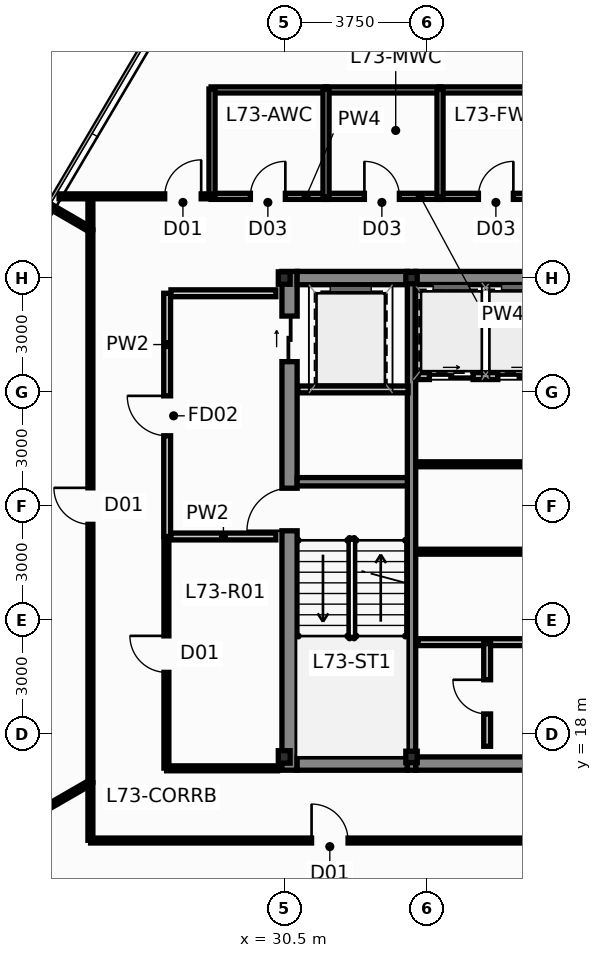
"""IFC4 building model, lengths in metres.
Left out: names, types, materials, properties, quantities, classifications, styles, units other than length and angle.
Written with IfcOpenShell. Run it as: python <this file> out.ifc"""

import sys

from ifc_helpers import new_model, si_unit, direction, frame, frame_2d, origin, origin_2d, place, context, subcontext, project, spatial, rectangle, hollow_rectangle, i_section, extrude, source, transform, mapped, element, fill, save


model = new_model("IFC4")
c1 = context("Model", 3, precision=1e-05, world=origin(), true_north=direction((0.0, 1.0)))
c2 = subcontext(c1, "Body", "Model", "MODEL_VIEW")
j1 = project(units=[si_unit("LENGTHUNIT", "METRE"), si_unit("PLANEANGLEUNIT", "RADIAN")], contexts=[c1])
p1 = place(None, origin())
s1 = spatial("IfcSite", under=j1, at=p1, CompositionType="ELEMENT")
p2 = place(p1, origin())
s2 = spatial("IfcBuilding", under=s1, at=p2, CompositionType="ELEMENT")
p3 = place(p2, frame((0.0, 0.0, 277.3)))
s3 = spatial("IfcBuildingStorey", under=s2, at=p3, CompositionType="ELEMENT", Elevation=277.3)
m1 = source(origin(), c2, "Body", "SweptSolid", [
    extrude(i_section(OverallWidth=0.311, OverallDepth=0.327, WebThickness=0.016, FlangeThickness=0.025, at=origin_2d()), origin(), (0.0, 0.0, 1.0), 3.65),
])
for number, where, z_axis, x_axis in (
    (1, (30.5, 17.4, 0.0), (0.0, 0.0, 1.0), (1.0, 0.0, 0.0)),
    (2, (30.5, 30.0, 0.0), (0.0, 0.0, 1.0), (1.0, 0.0, 0.0)),
):
    element("IfcColumn", number, at=place(p3, frame(where, z_axis=z_axis, x_axis=x_axis)), inside=s3, PredefinedType="COLUMN", context=c2, shape_type="MappedRepresentation", body=[
        mapped(m1, transform((0.0, 0.0, 0.0), scale=1.0)),
    ])
m2 = source(origin(), c2, "Body", "SweptSolid", [
    extrude(hollow_rectangle(XDim=0.3, YDim=0.3, WallThickness=0.012, at=origin_2d()), origin(), (0.0, 0.0, 1.0), 3.65),
])
for number, where, z_axis, x_axis in (
    (3, (33.85, 17.4, 0.0), (0.0, 0.0, 1.0), (1.0, 0.0, 0.0)),
    (4, (33.85, 30.0, 0.0), (0.0, 0.0, 1.0), (1.0, 0.0, 0.0)),
):
    element("IfcColumn", number, at=place(p3, frame(where, z_axis=z_axis, x_axis=x_axis)), inside=s3, PredefinedType="COLUMN", context=c2, shape_type="MappedRepresentation", body=[
        mapped(m2, transform((0.0, 0.0, 0.0), scale=1.0)),
    ])
p4 = place(p3, frame((30.64, 17.05, 0.0), z_axis=(0.0, 0.0, 1.0), x_axis=(0.0, 1.0, 0.0)))
e5 = element("IfcWall", 5, at=p4, inside=s3, PredefinedType="SHEAR", context=c2, shape_type="SweptSolid", body=[
    extrude(rectangle(XDim=13.125, YDim=0.4, at=frame_2d((6.562, 0.0))), origin(), (0.0, 0.0, 1.0), 3.65),
])
p5 = place(p4, frame((6.3, 0.0, 0.0)))
e6 = element("IfcOpeningElement", 6, at=p5, cuts=e5, PredefinedType="OPENING", context=c2, shape_type="SweptSolid", body=[
    extrude(rectangle(XDim=1.12, YDim=2.15, at=frame_2d((0.56, 1.075))), frame((0.0, 0.212, 0.0), z_axis=(0.0, -1.0, 0.0), x_axis=(1.0, 0.0, 0.0)), (0.0, 0.0, 1.0), 0.424),
])
p6 = place(p4, frame((10.75, 0.0, 0.0)))
e7 = element("IfcOpeningElement", 7, at=p6, cuts=e5, PredefinedType="OPENING", context=c2, shape_type="SweptSolid", body=[
    extrude(rectangle(XDim=1.2, YDim=2.2, at=frame_2d((0.6, 1.1))), frame((0.0, 0.212, 0.0), z_axis=(0.0, -1.0, 0.0), x_axis=(1.0, 0.0, 0.0)), (0.0, 0.0, 1.0), 0.424),
])
p7 = place(p3, frame((30.84, 17.225, 0.0), z_axis=(0.0, 0.0, 1.0), x_axis=(1.0, 0.0, 0.0)))
e8 = element("IfcWall", 8, at=p7, inside=s3, PredefinedType="SHEAR", context=c2, shape_type="SweptSolid", body=[
    extrude(rectangle(XDim=2.9, YDim=0.35, at=frame_2d((1.45, 0.0))), origin(), (0.0, 0.0, 1.0), 3.65),
])
p8 = place(p3, frame((33.96, 17.225, 0.0), z_axis=(0.0, 0.0, 1.0), x_axis=(1.0, 0.0, 0.0)))
e9 = element("IfcWall", 9, at=p8, inside=s3, PredefinedType="SHEAR", context=c2, shape_type="SweptSolid", body=[
    extrude(rectangle(XDim=8.08, YDim=0.35, at=frame_2d((4.04, 0.0))), origin(), (0.0, 0.0, 1.0), 3.65),
])
p9 = place(p3, frame((30.84, 30.0, 0.0), z_axis=(0.0, 0.0, 1.0), x_axis=(1.0, 0.0, 0.0)))
e10 = element("IfcWall", 10, at=p9, inside=s3, PredefinedType="SHEAR", context=c2, shape_type="SweptSolid", body=[
    extrude(rectangle(XDim=2.9, YDim=0.35, at=frame_2d((1.45, 0.0))), origin(), (0.0, 0.0, 1.0), 3.65),
])
p10 = place(p3, frame((33.96, 30.0, 0.0), z_axis=(0.0, 0.0, 1.0), x_axis=(1.0, 0.0, 0.0)))
e11 = element("IfcWall", 11, at=p10, inside=s3, PredefinedType="SHEAR", context=c2, shape_type="SweptSolid", body=[
    extrude(rectangle(XDim=3.78, YDim=0.35, at=frame_2d((1.89, 0.0))), origin(), (0.0, 0.0, 1.0), 3.65),
])
p11 = place(p3, frame((33.85, 17.05, 0.0), z_axis=(0.0, 0.0, 1.0), x_axis=(0.0, 1.0, 0.0)))
e12 = element("IfcWall", 12, at=p11, inside=s3, PredefinedType="SHEAR", context=c2, shape_type="SweptSolid", body=[
    extrude(rectangle(XDim=13.125, YDim=0.22, at=frame_2d((6.562, 0.0))), origin(), (0.0, 0.0, 1.0), 3.65),
])
p12 = place(p3, frame((30.84, 24.64, 0.0), z_axis=(0.0, 0.0, 1.0), x_axis=(1.0, 0.0, 0.0)))
e13 = element("IfcWall", 13, at=p12, inside=s3, PredefinedType="SHEAR", context=c2, shape_type="SweptSolid", body=[
    extrude(rectangle(XDim=2.9, YDim=0.22, at=frame_2d((1.45, 0.0))), origin(), (0.0, 0.0, 1.0), 3.65),
])
p13 = place(p3, frame((34.02, 27.42, 0.0), z_axis=(0.0, 0.0, 1.0), x_axis=(1.0, 0.0, 0.0)))
e14 = element("IfcWall", 14, at=p13, inside=s3, PredefinedType="PARTITIONING", context=c2, shape_type="SweptSolid", body=[
    extrude(rectangle(XDim=3.66, YDim=0.18, at=frame_2d((1.83, 0.0))), origin(), (0.0, 0.0, 1.0), 3.4),
])
p14 = place(p13, frame((0.3, 0.0, 0.0)))
e15 = element("IfcOpeningElement", 15, at=p14, cuts=e14, PredefinedType="OPENING", context=c2, shape_type="SweptSolid", body=[
    extrude(rectangle(XDim=1.15, YDim=2.2, at=frame_2d((0.575, 1.1))), frame((0.0, 0.102, 0.0), z_axis=(0.0, -1.0, 0.0), x_axis=(1.0, 0.0, 0.0)), (0.0, 0.0, 1.0), 0.204),
])
p15 = place(p13, frame((2.1, 0.0, 0.0)))
e16 = element("IfcOpeningElement", 16, at=p15, cuts=e14, PredefinedType="OPENING", context=c2, shape_type="SweptSolid", body=[
    extrude(rectangle(XDim=1.15, YDim=2.2, at=frame_2d((0.575, 1.1))), frame((0.0, 0.102, 0.0), z_axis=(0.0, -1.0, 0.0), x_axis=(1.0, 0.0, 0.0)), (0.0, 0.0, 1.0), 0.204),
])
p16 = place(p3, frame((27.42, 23.2, 0.0), z_axis=(0.0, 0.0, 1.0), x_axis=(0.0, 1.0, 0.0)))
e17 = element("IfcWall", 17, at=p16, inside=s3, PredefinedType="PARTITIONING", context=c2, shape_type="SweptSolid", body=[
    extrude(rectangle(XDim=6.4, YDim=0.18, at=frame_2d((3.2, 0.0))), origin(), (0.0, 0.0, 1.0), 3.085),
])
p17 = place(p16, frame((2.65, 0.0, 0.0)))
e18 = element("IfcOpeningElement", 18, at=p17, cuts=e17, PredefinedType="OPENING", context=c2, shape_type="SweptSolid", body=[
    extrude(rectangle(XDim=1.05, YDim=2.15, at=frame_2d((0.525, 1.075))), frame((0.0, 0.102, 0.0), z_axis=(0.0, -1.0, 0.0), x_axis=(1.0, 0.0, 0.0)), (0.0, 0.0, 1.0), 0.204),
])
for number, where, z_axis, x_axis in (
    (19, (27.52, 23.2, 0.0), (0.0, 0.0, 1.0), (1.0, 0.0, 0.0)),
    (20, (27.52, 29.6, 0.0), (0.0, 0.0, 1.0), (1.0, 0.0, 0.0)),
):
    element("IfcWall", number, at=place(p3, frame(where, z_axis=z_axis, x_axis=x_axis)), inside=s3, PredefinedType="PARTITIONING", context=c2, shape_type="SweptSolid", body=[
        extrude(rectangle(XDim=2.76, YDim=0.18, at=frame_2d((1.38, 0.0))), origin(), (0.0, 0.0, 1.0), 3.4),
    ])
p18 = place(p3, frame((30.86, 27.07, 0.0), z_axis=(0.0, 0.0, 1.0), x_axis=(1.0, 0.0, 0.0)))
e21 = element("IfcWall", 21, at=p18, inside=s3, PredefinedType="PARTITIONING", context=c2, shape_type="SweptSolid", body=[
    extrude(rectangle(XDim=2.9, YDim=0.18, at=frame_2d((1.45, 0.0))), origin(), (0.0, 0.0, 1.0), 3.4),
])
p19 = place(p3, frame((34.02, 20.42, 0.0), z_axis=(0.0, 0.0, 1.0), x_axis=(1.0, 0.0, 0.0)))
e22 = element("IfcWall", 22, at=p19, inside=s3, PredefinedType="PARTITIONING", context=c2, shape_type="SweptSolid", body=[
    extrude(rectangle(XDim=3.64, YDim=0.18, at=frame_2d((1.82, 0.0))), origin(), (0.0, 0.0, 1.0), 3.4),
])
for number, where, z_axis, x_axis in (
    (23, (34.02, 22.8, 0.0), (0.0, 0.0, 1.0), (1.0, 0.0, 0.0)),
    (24, (34.02, 25.1, 0.0), (0.0, 0.0, 1.0), (1.0, 0.0, 0.0)),
):
    element("IfcWall", number, at=place(p3, frame(where, z_axis=z_axis, x_axis=x_axis)), inside=s3, PredefinedType="PARTITIONING", context=c2, shape_type="SweptSolid", body=[
        extrude(rectangle(XDim=3.58, YDim=0.13, at=frame_2d((1.79, 0.0))), origin(), (0.0, 0.0, 1.0), 3.4),
    ])
p20 = place(p3, frame((35.84, 17.68, 0.0), z_axis=(0.0, 0.0, 1.0), x_axis=(0.0, 1.0, 0.0)))
e25 = element("IfcWall", 25, at=p20, inside=s3, PredefinedType="PARTITIONING", context=c2, shape_type="SweptSolid", body=[
    extrude(rectangle(XDim=2.7, YDim=0.18, at=frame_2d((1.35, 0.0))), origin(), (0.0, 0.0, 1.0), 3.4),
])
p21 = place(p20, frame((0.85, 0.0, 0.0)))
e26 = element("IfcOpeningElement", 26, at=p21, cuts=e25, PredefinedType="OPENING", context=c2, shape_type="SweptSolid", body=[
    extrude(rectangle(XDim=0.9, YDim=2.1, at=frame_2d((0.45, 1.05))), frame((0.0, 0.102, 0.0), z_axis=(0.0, -1.0, 0.0), x_axis=(1.0, 0.0, 0.0)), (0.0, 0.0, 1.0), 0.204),
])
p22 = place(p3, frame((28.575, 32.15, 0.0), z_axis=(0.0, 0.0, 1.0), x_axis=(1.0, 0.0, 0.0)))
e27 = element("IfcWall", 27, at=p22, inside=s3, PredefinedType="PLUMBINGWALL", context=c2, shape_type="SweptSolid", body=[
    extrude(rectangle(XDim=3.05, YDim=0.16, at=frame_2d((1.525, 0.0))), origin(), (0.0, 0.0, 1.0), 3.085),
])
p23 = place(p22, frame((1.035, 0.0, 0.0)))
e28 = element("IfcOpeningElement", 28, at=p23, cuts=e27, PredefinedType="OPENING", context=c2, shape_type="SweptSolid", body=[
    extrude(rectangle(XDim=0.92, YDim=2.1, at=frame_2d((0.46, 1.05))), frame((0.0, 0.092, 0.0), z_axis=(0.0, -1.0, 0.0), x_axis=(1.0, 0.0, 0.0)), (0.0, 0.0, 1.0), 0.184),
])
p24 = place(p3, frame((31.575, 32.15, 0.0), z_axis=(0.0, 0.0, 1.0), x_axis=(1.0, 0.0, 0.0)))
e29 = element("IfcWall", 29, at=p24, inside=s3, PredefinedType="PLUMBINGWALL", context=c2, shape_type="SweptSolid", body=[
    extrude(rectangle(XDim=3.05, YDim=0.16, at=frame_2d((1.525, 0.0))), origin(), (0.0, 0.0, 1.0), 3.085),
])
p25 = place(p24, frame((1.035, 0.0, 0.0)))
e30 = element("IfcOpeningElement", 30, at=p25, cuts=e29, PredefinedType="OPENING", context=c2, shape_type="SweptSolid", body=[
    extrude(rectangle(XDim=0.92, YDim=2.1, at=frame_2d((0.46, 1.05))), frame((0.0, 0.092, 0.0), z_axis=(0.0, -1.0, 0.0), x_axis=(1.0, 0.0, 0.0)), (0.0, 0.0, 1.0), 0.184),
])
p26 = place(p3, frame((34.575, 32.15, 0.0), z_axis=(0.0, 0.0, 1.0), x_axis=(1.0, 0.0, 0.0)))
e31 = element("IfcWall", 31, at=p26, inside=s3, PredefinedType="PLUMBINGWALL", context=c2, shape_type="SweptSolid", body=[
    extrude(rectangle(XDim=3.05, YDim=0.16, at=frame_2d((1.525, 0.0))), origin(), (0.0, 0.0, 1.0), 3.085),
])
p27 = place(p26, frame((1.035, 0.0, 0.0)))
e32 = element("IfcOpeningElement", 32, at=p27, cuts=e31, PredefinedType="OPENING", context=c2, shape_type="SweptSolid", body=[
    extrude(rectangle(XDim=0.92, YDim=2.1, at=frame_2d((0.46, 1.05))), frame((0.0, 0.092, 0.0), z_axis=(0.0, -1.0, 0.0), x_axis=(1.0, 0.0, 0.0)), (0.0, 0.0, 1.0), 0.184),
])
p28 = place(p3, frame((28.575, 34.95, 0.0), z_axis=(0.0, 0.0, 1.0), x_axis=(1.0, 0.0, 0.0)))
e33 = element("IfcWall", 33, at=p28, inside=s3, PredefinedType="PLUMBINGWALL", context=c2, shape_type="SweptSolid", body=[
    extrude(rectangle(XDim=3.05, YDim=0.16, at=frame_2d((1.525, 0.0))), origin(), (0.0, 0.0, 1.0), 3.4),
])
for number, where, z_axis, x_axis in (
    (34, (31.575, 34.95, 0.0), (0.0, 0.0, 1.0), (1.0, 0.0, 0.0)),
    (35, (37.625, 34.95, 0.0), (0.0, 0.0, 1.0), (-1.0, 0.0, 0.0)),
):
    element("IfcWall", number, at=place(p3, frame(where, z_axis=z_axis, x_axis=x_axis)), inside=s3, PredefinedType="PLUMBINGWALL", context=c2, shape_type="SweptSolid", body=[
        extrude(rectangle(XDim=3.05, YDim=0.16, at=frame_2d((1.525, 0.0))), origin(), (0.0, 0.0, 1.0), 3.085),
    ])
for number, where, z_axis, x_axis in (
    (36, (31.6, 32.125, 0.0), (0.0, 0.0, 1.0), (0.0, 1.0, 0.0)),
    (37, (28.6, 32.125, 0.0), (0.0, 0.0, 1.0), (0.0, 1.0, 0.0)),
):
    element("IfcWall", number, at=place(p3, frame(where, z_axis=z_axis, x_axis=x_axis)), inside=s3, PredefinedType="PLUMBINGWALL", context=c2, shape_type="SweptSolid", body=[
        extrude(rectangle(XDim=2.85, YDim=0.16, at=frame_2d((1.425, 0.0))), origin(), (0.0, 0.0, 1.0), 2.985),
    ])
p29 = place(p3, frame((34.6, 32.125, 0.0), z_axis=(0.0, 0.0, 1.0), x_axis=(0.0, 1.0, 0.0)))
e38 = element("IfcWall", 38, at=p29, inside=s3, PredefinedType="PLUMBINGWALL", context=c2, shape_type="SweptSolid", body=[
    extrude(rectangle(XDim=2.85, YDim=0.16, at=frame_2d((1.425, 0.0))), origin(), (0.0, 0.0, 1.0), 3.4),
])
p30 = place(p3, frame((25.4, 16.735, 0.0), z_axis=(0.0, 0.0, 1.0), x_axis=(0.0, 1.0, 0.0)))
e39 = element("IfcWall", 39, at=p30, inside=s3, PredefinedType="PARTITIONING", context=c2, shape_type="SweptSolid", body=[
    extrude(rectangle(XDim=14.53, YDim=0.13, at=frame_2d((7.265, 0.0))), origin(), (0.0, 0.0, 1.0), 3.085),
])
p31 = place(p30, frame((6.785, 0.0, 0.0)))
e40 = element("IfcOpeningElement", 40, at=p31, cuts=e39, PredefinedType="OPENING", context=c2, shape_type="SweptSolid", body=[
    extrude(rectangle(XDim=0.96, YDim=2.15, at=frame_2d((0.48, 1.075))), frame((0.0, 0.077, 0.0), z_axis=(0.0, -1.0, 0.0), x_axis=(1.0, 0.0, 0.0)), (0.0, 0.0, 1.0), 0.154),
])
p32 = place(p3, frame((13.854, 10.059, 0.0), z_axis=(0.0, 0.0, 1.0), x_axis=(0.865873183118, 0.500263561293, 0.0)))
e41 = element("IfcWall", 41, at=p32, inside=s3, PredefinedType="PARTITIONING", context=c2, shape_type="SweptSolid", body=[
    extrude(rectangle(XDim=13.33, YDim=0.13, at=frame_2d((6.665, 0.0))), origin(), (0.0, 0.0, 1.0), 2.985),
])
p33 = place(p3, frame((25.405, 15.2, 0.0), z_axis=(0.0, 0.0, 1.0), x_axis=(1.0, 0.0, 0.0)))
e42 = element("IfcWall", 42, at=p33, inside=s3, PredefinedType="PARTITIONING", context=c2, shape_type="SweptSolid", body=[
    extrude(rectangle(XDim=12.59, YDim=0.13, at=frame_2d((6.295, 0.0))), origin(), (0.0, 0.0, 1.0), 3.085),
])
p34 = place(p33, frame((5.815, 0.0, 0.0)))
e43 = element("IfcOpeningElement", 43, at=p34, cuts=e42, PredefinedType="OPENING", context=c2, shape_type="SweptSolid", body=[
    extrude(rectangle(XDim=0.96, YDim=2.15, at=frame_2d((0.48, 1.075))), frame((0.0, 0.077, 0.0), z_axis=(0.0, -1.0, 0.0), x_axis=(1.0, 0.0, 0.0)), (0.0, 0.0, 1.0), 0.154),
])
p35 = place(p3, frame((27.4, 17.105, 0.0), z_axis=(0.0, 0.0, 1.0), x_axis=(0.0, 1.0, 0.0)))
e44 = element("IfcWall", 44, at=p35, inside=s3, PredefinedType="PARTITIONING", context=c2, shape_type="SweptSolid", body=[
    extrude(rectangle(XDim=6.0, YDim=0.13, at=frame_2d((3.0, 0.0))), origin(), (0.0, 0.0, 1.0), 3.085),
])
p36 = place(p35, frame((2.52, 0.0, 0.0)))
e45 = element("IfcOpeningElement", 45, at=p36, cuts=e44, PredefinedType="OPENING", context=c2, shape_type="SweptSolid", body=[
    extrude(rectangle(XDim=0.96, YDim=2.15, at=frame_2d((0.48, 1.075))), frame((0.0, 0.077, 0.0), z_axis=(0.0, -1.0, 0.0), x_axis=(1.0, 0.0, 0.0)), (0.0, 0.0, 1.0), 0.154),
])
p37 = place(p3, frame((24.575, 32.15, 0.0), z_axis=(0.0, 0.0, 1.0), x_axis=(1.0, 0.0, 0.0)))
e46 = element("IfcWall", 46, at=p37, inside=s3, PredefinedType="PARTITIONING", context=c2, shape_type="SweptSolid", body=[
    extrude(rectangle(XDim=4.02, YDim=0.13, at=frame_2d((2.01, 0.0))), origin(), (0.0, 0.0, 1.0), 3.4),
])
p38 = place(p37, frame((2.78, 0.0, 0.0)))
e47 = element("IfcOpeningElement", 47, at=p38, cuts=e46, PredefinedType="OPENING", context=c2, shape_type="SweptSolid", body=[
    extrude(rectangle(XDim=0.96, YDim=2.15, at=frame_2d((0.48, 1.075))), frame((0.0, 0.077, 0.0), z_axis=(0.0, -1.0, 0.0), x_axis=(1.0, 0.0, 0.0)), (0.0, 0.0, 1.0), 0.154),
])
p39 = place(p3, frame((30.325, 17.1, 0.0), z_axis=(0.0, 0.0, 1.0), x_axis=(-1.0, 0.0, 0.0)))
e48 = element("IfcWall", 48, at=p39, inside=s3, PredefinedType="PARTITIONING", context=c2, shape_type="SweptSolid", body=[
    extrude(rectangle(XDim=2.92, YDim=0.13, at=frame_2d((1.46, 0.0))), origin(), (0.0, 0.0, 1.0), 2.985),
])
p40 = place(p3, frame((25.4, 16.725, 0.0), z_axis=(0.0, 0.0, 1.0), x_axis=(0.0, -1.0, 0.0)))
e49 = element("IfcWall", 49, at=p40, inside=s3, PredefinedType="PARTITIONING", context=c2, shape_type="SweptSolid", body=[
    extrude(rectangle(XDim=1.52, YDim=0.13, at=frame_2d((0.76, 0.0))), origin(), (0.0, 0.0, 1.0), 3.4),
])
p41 = place(p3, frame((24.38, 31.864, 0.0), z_axis=(0.0, 0.0, 1.0), x_axis=(0.864576450131, -0.50250130535, 0.0)))
e50 = element("IfcWall", 50, at=p41, inside=s3, PredefinedType="PARTITIONING", context=c2, shape_type="SweptSolid", body=[
    extrude(rectangle(XDim=1.175, YDim=0.13, at=frame_2d((0.588, 0.0))), origin(), (0.0, 0.0, 1.0), 3.4),
])
p42 = place(p3, frame((25.4, 31.275, 0.0), z_axis=(0.0, 0.0, 1.0), x_axis=(0.0, 1.0, 0.0)))
e51 = element("IfcWall", 51, at=p42, inside=s3, PredefinedType="PARTITIONING", context=c2, shape_type="SweptSolid", body=[
    extrude(rectangle(XDim=0.87, YDim=0.13, at=frame_2d((0.435, 0.0))), origin(), (0.0, 0.0, 1.0), 3.4),
])
p43 = place(p5, origin())
e52 = element("IfcDoor", 52, at=p43, inside=s3, OperationType="SINGLE_SWING_LEFT", PredefinedType="DOOR", context=c2, shape_type="SweptSolid", body=[
    extrude(rectangle(XDim=1.12, YDim=2.15, at=frame_2d((0.56, 1.075))), frame((0.0, 0.025, 0.0), z_axis=(0.0, -1.0, 0.0), x_axis=(1.0, 0.0, 0.0)), (0.0, 0.0, 1.0), 0.05),
])
fill(e6, e52)
p44 = place(p6, origin())
e53 = element("IfcDoor", 53, at=p44, inside=s3, OperationType="SLIDING_TO_LEFT", PredefinedType="DOOR", context=c2, shape_type="SweptSolid", body=[
    extrude(rectangle(XDim=1.2, YDim=2.2, at=frame_2d((0.6, 1.1))), frame((0.0, 0.025, 0.0), z_axis=(0.0, -1.0, 0.0), x_axis=(1.0, 0.0, 0.0)), (0.0, 0.0, 1.0), 0.05),
])
fill(e7, e53)
p45 = place(p14, origin())
e54 = element("IfcDoor", 54, at=p45, inside=s3, OperationType="SLIDING_TO_RIGHT", PredefinedType="DOOR", context=c2, shape_type="SweptSolid", body=[
    extrude(rectangle(XDim=1.15, YDim=2.2, at=frame_2d((0.575, 1.1))), frame((0.0, 0.025, 0.0), z_axis=(0.0, -1.0, 0.0), x_axis=(1.0, 0.0, 0.0)), (0.0, 0.0, 1.0), 0.05),
])
fill(e15, e54)
p46 = place(p15, origin())
e55 = element("IfcDoor", 55, at=p46, inside=s3, OperationType="SLIDING_TO_LEFT", PredefinedType="DOOR", context=c2, shape_type="SweptSolid", body=[
    extrude(rectangle(XDim=1.15, YDim=2.2, at=frame_2d((0.575, 1.1))), frame((0.0, 0.025, 0.0), z_axis=(0.0, -1.0, 0.0), x_axis=(1.0, 0.0, 0.0)), (0.0, 0.0, 1.0), 0.05),
])
fill(e16, e55)
p47 = place(p17, origin())
e56 = element("IfcDoor", 56, at=p47, inside=s3, OperationType="SINGLE_SWING_RIGHT", PredefinedType="DOOR", context=c2, shape_type="SweptSolid", body=[
    extrude(rectangle(XDim=1.05, YDim=2.15, at=frame_2d((0.525, 1.075))), frame((0.0, 0.025, 0.0), z_axis=(0.0, -1.0, 0.0), x_axis=(1.0, 0.0, 0.0)), (0.0, 0.0, 1.0), 0.05),
])
fill(e18, e56)
p48 = place(p21, origin())
e57 = element("IfcDoor", 57, at=p48, inside=s3, OperationType="SINGLE_SWING_RIGHT", PredefinedType="DOOR", context=c2, shape_type="SweptSolid", body=[
    extrude(rectangle(XDim=0.9, YDim=2.1, at=frame_2d((0.45, 1.05))), frame((0.0, 0.025, 0.0), z_axis=(0.0, -1.0, 0.0), x_axis=(1.0, 0.0, 0.0)), (0.0, 0.0, 1.0), 0.05),
])
fill(e26, e57)
p49 = place(p23, origin())
e58 = element("IfcDoor", 58, at=p49, inside=s3, OperationType="SINGLE_SWING_RIGHT", PredefinedType="DOOR", context=c2, shape_type="SweptSolid", body=[
    extrude(rectangle(XDim=0.92, YDim=2.1, at=frame_2d((0.46, 1.05))), frame((0.0, 0.025, 0.0), z_axis=(0.0, -1.0, 0.0), x_axis=(1.0, 0.0, 0.0)), (0.0, 0.0, 1.0), 0.05),
])
fill(e28, e58)
p50 = place(p25, origin())
e59 = element("IfcDoor", 59, at=p50, inside=s3, OperationType="SINGLE_SWING_LEFT", PredefinedType="DOOR", context=c2, shape_type="SweptSolid", body=[
    extrude(rectangle(XDim=0.92, YDim=2.1, at=frame_2d((0.46, 1.05))), frame((0.0, 0.025, 0.0), z_axis=(0.0, -1.0, 0.0), x_axis=(1.0, 0.0, 0.0)), (0.0, 0.0, 1.0), 0.05),
])
fill(e30, e59)
p51 = place(p27, origin())
e60 = element("IfcDoor", 60, at=p51, inside=s3, OperationType="SINGLE_SWING_RIGHT", PredefinedType="DOOR", context=c2, shape_type="SweptSolid", body=[
    extrude(rectangle(XDim=0.92, YDim=2.1, at=frame_2d((0.46, 1.05))), frame((0.0, 0.025, 0.0), z_axis=(0.0, -1.0, 0.0), x_axis=(1.0, 0.0, 0.0)), (0.0, 0.0, 1.0), 0.05),
])
fill(e32, e60)
p52 = place(p31, origin())
e61 = element("IfcDoor", 61, at=p52, inside=s3, OperationType="SINGLE_SWING_RIGHT", PredefinedType="DOOR", context=c2, shape_type="SweptSolid", body=[
    extrude(rectangle(XDim=0.96, YDim=2.15, at=frame_2d((0.48, 1.075))), frame((0.0, 0.025, 0.0), z_axis=(0.0, -1.0, 0.0), x_axis=(1.0, 0.0, 0.0)), (0.0, 0.0, 1.0), 0.05),
])
fill(e40, e61)
p53 = place(p34, origin())
e62 = element("IfcDoor", 62, at=p53, inside=s3, OperationType="SINGLE_SWING_LEFT", PredefinedType="DOOR", context=c2, shape_type="SweptSolid", body=[
    extrude(rectangle(XDim=0.96, YDim=2.15, at=frame_2d((0.48, 1.075))), frame((0.0, 0.025, 0.0), z_axis=(0.0, -1.0, 0.0), x_axis=(1.0, 0.0, 0.0)), (0.0, 0.0, 1.0), 0.05),
])
fill(e43, e62)
p54 = place(p36, origin())
e63 = element("IfcDoor", 63, at=p54, inside=s3, OperationType="SINGLE_SWING_RIGHT", PredefinedType="DOOR", context=c2, shape_type="SweptSolid", body=[
    extrude(rectangle(XDim=0.96, YDim=2.15, at=frame_2d((0.48, 1.075))), frame((0.0, 0.025, 0.0), z_axis=(0.0, -1.0, 0.0), x_axis=(1.0, 0.0, 0.0)), (0.0, 0.0, 1.0), 0.05),
])
fill(e45, e63)
p55 = place(p38, origin())
e64 = element("IfcDoor", 64, at=p55, inside=s3, OperationType="SINGLE_SWING_RIGHT", PredefinedType="DOOR", context=c2, shape_type="SweptSolid", body=[
    extrude(rectangle(XDim=0.96, YDim=2.15, at=frame_2d((0.48, 1.075))), frame((0.0, 0.025, 0.0), z_axis=(0.0, -1.0, 0.0), x_axis=(1.0, 0.0, 0.0)), (0.0, 0.0, 1.0), 0.05),
])
fill(e47, e64)
save(model, sys.argv[1])
